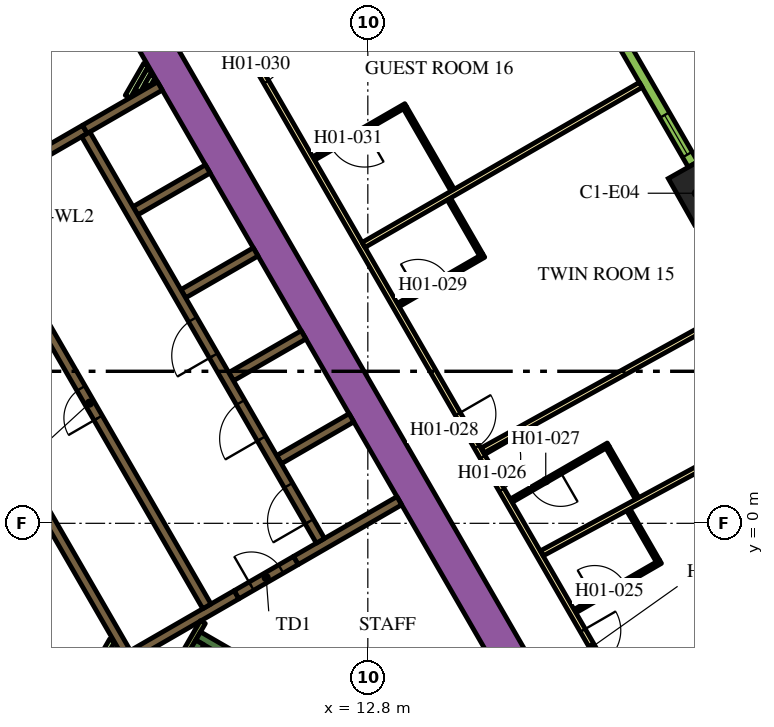
"""IFC4 building model, lengths in metres.
Left out: names, types, materials, properties, quantities, classifications, styles, units other than length and angle.
Written with IfcOpenShell. Run it as: python <this file> out.ifc"""

import sys

from ifc_helpers import new_model, si_unit, direction, frame, frame_2d, origin, origin_2d, place, context, subcontext, project, spatial, polyline, rectangle, outline, extrude, element, fill, save


model = new_model("IFC4")
c1 = context("Model", 3, precision=1e-05, world=origin(), true_north=direction((0.0, 1.0)))
c2 = subcontext(c1, "Body", "Model", "MODEL_VIEW")
j1 = project(units=[si_unit("LENGTHUNIT", "METRE"), si_unit("PLANEANGLEUNIT", "RADIAN")], contexts=[c1])
p1 = place(None, origin())
s1 = spatial("IfcSite", under=j1, at=p1, CompositionType="ELEMENT")
p2 = place(p1, origin())
s2 = spatial("IfcBuilding", under=s1, at=p2, CompositionType="ELEMENT")
p3 = place(p2, frame((0.0, 0.0, 31.5)))
s3 = spatial("IfcBuildingStorey", under=s2, at=p3, CompositionType="ELEMENT", Elevation=31.5)
p4 = place(p3, frame((21.443, 8.685, 0.0), z_axis=(0.0, 0.0, 1.0), x_axis=(-0.491973853463, 0.870609974391, 0.0)))
e1 = element("IfcColumn", 1, at=p4, inside=s3, PredefinedType="COLUMN", context=c2, shape_type="SweptSolid", body=[
    extrude(rectangle(XDim=1.4, YDim=0.9, at=origin_2d()), origin(), (0.0, 0.0, 1.0), 3.9),
])
p5 = place(p3, frame((6.711, 13.476, 0.0), z_axis=(0.0, 0.0, 1.0), x_axis=(0.500002723396, -0.866023831425, 0.0)))
e2 = element("IfcWall", 2, at=p5, inside=s3, PredefinedType="SOLIDWALL", context=c2, shape_type="SweptSolid", body=[
    extrude(rectangle(XDim=20.334, YDim=0.9, at=frame_2d((10.167, 0.0))), origin(), (0.0, 0.0, 1.0), 3.9),
])
p6 = place(p3, frame((8.334, -2.964, 0.0), z_axis=(0.0, 0.0, 1.0), x_axis=(0.866016039709, -0.500016218704, 0.0)))
e3 = element("IfcWall", 3, at=p6, inside=s3, PredefinedType="SOLIDWALL", context=c2, shape_type="SweptSolid", body=[
    extrude(rectangle(XDim=7.05, YDim=0.25, at=frame_2d((3.525, 0.0))), origin(), (0.0, 0.0, 1.0), 3.9),
])
p7 = place(p3, frame((8.168, -3.503, 0.0), z_axis=(0.0, 0.0, 1.0), x_axis=(0.49972245349, 0.866185586049, 0.0)))
e4 = element("IfcWall", 4, at=p7, inside=s3, PredefinedType="SOLIDWALL", context=c2, shape_type="SweptSolid", body=[
    extrude(rectangle(XDim=0.425, YDim=0.25, at=frame_2d((0.212, 0.0))), origin(), (0.0, 0.0, 1.0), 3.9),
])
p8 = place(p3, frame((10.464, 1.677, 0.0), z_axis=(0.0, 0.0, 1.0), x_axis=(0.86605622881, 0.499946605688, 0.0)))
e5 = element("IfcWall", 5, at=p8, inside=s3, PredefinedType="SOLIDWALL", context=c2, shape_type="SweptSolid", body=[
    extrude(rectangle(XDim=2.2, YDim=0.25, at=frame_2d((1.1, 0.0))), origin(), (0.0, 0.0, 1.0), 3.9),
])
p9 = place(p3, frame((13.629, 0.594, 0.0), z_axis=(0.0, 0.0, 1.0), x_axis=(-0.86602790099, -0.499995674689, 0.0)))
e6 = element("IfcWall", 6, at=p9, inside=s3, PredefinedType="SOLIDWALL", context=c2, shape_type="SweptSolid", body=[
    extrude(rectangle(XDim=3.146, YDim=0.25, at=frame_2d((1.573, 0.0))), origin(), (0.0, 0.0, 1.0), 3.9),
])
p10 = place(p3, origin())
e7 = element("IfcWall", 7, at=p10, inside=s3, PredefinedType="SOLIDWALL", context=c2, shape_type="SweptSolid", body=[
    extrude(outline(polyline([(0.566, 6.725), (0.566, 6.875), (0.566, 6.875), (0.565, 6.875), (0.361, 6.875), (0.035, 7.439), (0.252, 7.564), (0.377, 7.348), (6.552, -3.348), (6.677, -3.564), (6.46, -3.689), (0.448, 6.725), (0.565, 6.725), (0.566, 6.725), (0.566, 6.725)])), origin(), (0.0, 0.0, 1.0), 3.9),
])
p11 = place(p3, frame((4.358, 9.791, 0.0), z_axis=(0.0, 0.0, 1.0), x_axis=(0.866079547155, 0.499906209203, 0.0)))
e8 = element("IfcWall", 8, at=p11, inside=s3, PredefinedType="SOLIDWALL", context=c2, shape_type="SweptSolid", body=[
    extrude(rectangle(XDim=1.15, YDim=0.25, at=frame_2d((0.575, 0.0))), origin(), (0.0, 0.0, 1.0), 3.9),
])
p12 = place(p3, frame((5.356, 10.367, 0.0), z_axis=(0.0, 0.0, 1.0), x_axis=(0.865978535641, 0.50008116922, 0.0)))
e9 = element("IfcWall", 9, at=p12, inside=s3, PredefinedType="SOLIDWALL", context=c2, shape_type="SweptSolid", body=[
    extrude(rectangle(XDim=2.278, YDim=0.25, at=frame_2d((1.139, 0.0))), origin(), (0.0, 0.0, 1.0), 3.9),
])
p13 = place(p3, frame((6.614, -3.456, 0.0), z_axis=(0.0, 0.0, 1.0), x_axis=(0.86602447079, 0.500001615989, 0.0)))
e10 = element("IfcWall", 10, at=p13, inside=s3, PredefinedType="SOLIDWALL", context=c2, shape_type="SweptSolid", body=[
    extrude(rectangle(XDim=3.154, YDim=0.25, at=frame_2d((1.577, 0.0))), origin(), (0.0, 0.0, 1.0), 3.9),
])
for number, where, z_axis, x_axis in (
    (11, (6.684, 8.224, 0.0), (0.0, 0.0, 1.0), (0.866, 0.5, 0.0)),
    (12, (7.944, 6.041, 0.0), (0.0, 0.0, 1.0), (0.866, 0.5, 0.0)),
    (13, (9.204, 3.859, 0.0), (0.0, 0.0, 1.0), (0.866, 0.5, 0.0)),
):
    element("IfcWall", number, at=place(p3, frame(where, z_axis=z_axis, x_axis=x_axis)), inside=s3, PredefinedType="SOLIDWALL", context=c2, shape_type="SweptSolid", body=[
        extrude(rectangle(XDim=2.2, YDim=0.25, at=frame_2d((1.1, 0.0))), origin(), (0.0, 0.0, 1.0), 3.9),
    ])
p14 = place(p3, frame((5.705, -3.718, 0.0), z_axis=(0.0, 0.0, 1.0), x_axis=(0.499962090823, 0.866047289552, 0.0)))
e14 = element("IfcWall", 14, at=p14, inside=s3, PredefinedType="PARTITIONING", context=c2, shape_type="SweptSolid", body=[
    extrude(rectangle(XDim=0.735, YDim=0.15, at=frame_2d((0.367, 0.0))), origin(), (0.0, 0.0, 1.0), 2.75),
])
p15 = place(p3, frame((8.459, -2.599, 0.0), z_axis=(0.0, 0.0, 1.0), x_axis=(-0.500041054325, -0.866001699761, 0.0)))
e15 = element("IfcWall", 15, at=p15, inside=s3, PredefinedType="PARTITIONING", context=c2, shape_type="SweptSolid", body=[
    extrude(rectangle(XDim=0.929, YDim=0.15, at=frame_2d((0.464, 0.0))), origin(), (0.0, 0.0, 1.0), 3.9),
])
p16 = place(p3, frame((6.482, 11.225, 0.0), z_axis=(0.0, 0.0, 1.0), x_axis=(0.5001061818, 0.865964091014, 0.0)))
e16 = element("IfcWall", 16, at=p16, inside=s3, PredefinedType="PARTITIONING", context=c2, shape_type="SweptSolid", body=[
    extrude(rectangle(XDim=0.973, YDim=0.15, at=frame_2d((0.486, 0.0))), origin(), (0.0, 0.0, 1.0), 2.75),
])
p17 = place(p3, frame((6.742, 11.375, 0.0), z_axis=(0.0, 0.0, 1.0), x_axis=(0.499744951064, 0.86617260629, 0.0)))
e17 = element("IfcWall", 17, at=p17, inside=s3, PredefinedType="PARTITIONING", context=c2, shape_type="SweptSolid", body=[
    extrude(rectangle(XDim=0.626, YDim=0.15, at=frame_2d((0.313, 0.0))), origin(), (0.0, 0.0, 1.0), 2.75),
])
p18 = place(p3, frame((7.001, 11.525, 0.0), z_axis=(0.0, 0.0, 1.0), x_axis=(0.499797962495, 0.866142018774, 0.0)))
e18 = element("IfcWall", 18, at=p18, inside=s3, PredefinedType="PARTITIONING", context=c2, shape_type="SweptSolid", body=[
    extrude(rectangle(XDim=0.28, YDim=0.15, at=frame_2d((0.14, 0.0))), origin(), (0.0, 0.0, 1.0), 2.75),
])
p19 = place(p3, frame((11.553, -0.46, 0.0), z_axis=(0.0, 0.0, 1.0), x_axis=(-0.500006514828, 0.866021642414, 0.0)))
e19 = element("IfcWall", 19, at=p19, inside=s3, PredefinedType="SOLIDWALL", context=c2, shape_type="SweptSolid", body=[
    extrude(rectangle(XDim=12.35, YDim=0.25, at=frame_2d((6.175, 0.0))), origin(), (0.0, 0.0, 1.0), 3.9),
])
p20 = place(p19, frame((0.585, 0.0, 0.0)))
e20 = element("IfcOpeningElement", 20, at=p20, cuts=e19, PredefinedType="OPENING", context=c2, shape_type="SweptSolid", body=[
    extrude(rectangle(XDim=1.1, YDim=2.1, at=frame_2d((0.55, 1.05))), frame((0.0, 0.135, 0.0), z_axis=(0.0, -1.0, 0.0), x_axis=(1.0, 0.0, 0.0)), (0.0, 0.0, 1.0), 0.27),
])
p21 = place(p19, frame((3.105, 0.0, 0.0)))
e21 = element("IfcOpeningElement", 21, at=p21, cuts=e19, PredefinedType="OPENING", context=c2, shape_type="SweptSolid", body=[
    extrude(rectangle(XDim=1.1, YDim=2.1, at=frame_2d((0.55, 1.05))), frame((0.0, 0.135, 0.0), z_axis=(0.0, -1.0, 0.0), x_axis=(1.0, 0.0, 0.0)), (0.0, 0.0, 1.0), 0.27),
])
p22 = place(p19, frame((5.625, 0.0, 0.0)))
e22 = element("IfcOpeningElement", 22, at=p22, cuts=e19, PredefinedType="OPENING", context=c2, shape_type="SweptSolid", body=[
    extrude(rectangle(XDim=1.1, YDim=2.1, at=frame_2d((0.55, 1.05))), frame((0.0, 0.135, 0.0), z_axis=(0.0, -1.0, 0.0), x_axis=(1.0, 0.0, 0.0)), (0.0, 0.0, 1.0), 0.27),
])
p23 = place(p3, frame((8.565, -2.185, 0.0), z_axis=(0.0, 0.0, 1.0), x_axis=(-0.499997954832, 0.866026584559, 0.0)))
e23 = element("IfcWall", 23, at=p23, inside=s3, PredefinedType="SOLIDWALL", context=c2, shape_type="SweptSolid", body=[
    extrude(rectangle(XDim=12.35, YDim=0.25, at=frame_2d((6.175, 0.0))), origin(), (0.0, 0.0, 1.0), 3.9),
])
p24 = place(p23, frame((5.725, 0.0, 0.0)))
e24 = element("IfcOpeningElement", 24, at=p24, cuts=e23, PredefinedType="OPENING", context=c2, shape_type="SweptSolid", body=[
    extrude(rectangle(XDim=0.9, YDim=2.1, at=frame_2d((0.45, 1.05))), frame((0.0, 0.135, 0.0), z_axis=(0.0, -1.0, 0.0), x_axis=(1.0, 0.0, 0.0)), (0.0, 0.0, 1.0), 0.27),
])
p25 = place(p3, frame((9.346, -1.879, 0.0), z_axis=(0.0, 0.0, 1.0), x_axis=(0.866047807691, 0.499961193289, 0.0)))
e25 = element("IfcWall", 25, at=p25, inside=s3, PredefinedType="SOLIDWALL", context=c2, shape_type="SweptSolid", body=[
    extrude(rectangle(XDim=1.8, YDim=0.25, at=frame_2d((0.9, 0.0))), origin(), (0.0, 0.0, 1.0), 3.9),
])
p26 = place(p25, frame((0.45, 0.0, 0.0)))
e26 = element("IfcOpeningElement", 26, at=p26, cuts=e25, PredefinedType="OPENING", context=c2, shape_type="SweptSolid", body=[
    extrude(rectangle(XDim=0.9, YDim=2.1, at=frame_2d((0.45, 1.05))), frame((0.0, 0.135, 0.0), z_axis=(0.0, -1.0, 0.0), x_axis=(1.0, 0.0, 0.0)), (0.0, 0.0, 1.0), 0.27),
])
p27 = place(p3, frame((6.163, 18.475, 0.0), z_axis=(0.0, 0.0, 1.0), x_axis=(0.500001317485, -0.866024643133, 0.0)))
e27 = element("IfcWall", 27, at=p27, inside=s3, PredefinedType="PARTITIONING", context=c2, shape_type="SweptSolid", body=[
    extrude(rectangle(XDim=25.767, YDim=0.15, at=frame_2d((12.883, 0.0))), origin(), (0.0, 0.0, 1.0), 2.75),
])
p28 = place(p27, frame((24.586, 0.0, 0.0)))
e28 = element("IfcOpeningElement", 28, at=p28, cuts=e27, PredefinedType="OPENING", context=c2, shape_type="SweptSolid", body=[
    extrude(rectangle(XDim=1.0, YDim=2.1, at=frame_2d((0.5, 1.05))), frame((0.0, 0.085, 0.0), z_axis=(0.0, -1.0, 0.0), x_axis=(1.0, 0.0, 0.0)), (0.0, 0.0, 1.0), 0.17),
])
p29 = place(p27, frame((19.319, 0.0, 0.0)))
e29 = element("IfcOpeningElement", 29, at=p29, cuts=e27, PredefinedType="OPENING", context=c2, shape_type="SweptSolid", body=[
    extrude(rectangle(XDim=1.0, YDim=2.1, at=frame_2d((0.5, 1.05))), frame((0.0, 0.085, 0.0), z_axis=(0.0, -1.0, 0.0), x_axis=(1.0, 0.0, 0.0)), (0.0, 0.0, 1.0), 0.17),
])
p30 = place(p27, frame((18.012, 0.0, 0.0)))
e30 = element("IfcOpeningElement", 30, at=p30, cuts=e27, PredefinedType="OPENING", context=c2, shape_type="SweptSolid", body=[
    extrude(rectangle(XDim=1.0, YDim=2.1, at=frame_2d((0.5, 1.05))), frame((0.0, 0.085, 0.0), z_axis=(0.0, -1.0, 0.0), x_axis=(1.0, 0.0, 0.0)), (0.0, 0.0, 1.0), 0.17),
])
p31 = place(p27, frame((6.824, 0.0, 0.0)))
e31 = element("IfcOpeningElement", 31, at=p31, cuts=e27, PredefinedType="OPENING", context=c2, shape_type="SweptSolid", body=[
    extrude(rectangle(XDim=1.1, YDim=2.1, at=frame_2d((0.55, 1.05))), frame((0.0, 0.085, 0.0), z_axis=(0.0, -1.0, 0.0), x_axis=(1.0, 0.0, 0.0)), (0.0, 0.0, 1.0), 0.17),
])
p32 = place(p27, frame((4.658, 0.0, 0.0)))
e32 = element("IfcOpeningElement", 32, at=p32, cuts=e27, PredefinedType="OPENING", context=c2, shape_type="SweptSolid", body=[
    extrude(rectangle(XDim=0.9, YDim=2.1, at=frame_2d((0.45, 1.05))), frame((0.0, 0.085, 0.0), z_axis=(0.0, -1.0, 0.0), x_axis=(1.0, 0.0, 0.0)), (0.0, 0.0, 1.0), 0.17),
])
p33 = place(p27, frame((0.18, 0.0, 0.0)))
e33 = element("IfcOpeningElement", 33, at=p33, cuts=e27, PredefinedType="OPENING", context=c2, shape_type="SweptSolid", body=[
    extrude(rectangle(XDim=1.0, YDim=2.1, at=frame_2d((0.5, 1.05))), frame((0.0, 0.085, 0.0), z_axis=(0.0, -1.0, 0.0), x_axis=(1.0, 0.0, 0.0)), (0.0, 0.0, 1.0), 0.17),
])
p34 = place(p3, frame((19.982, 11.537, 0.0), z_axis=(0.0, 0.0, 1.0), x_axis=(-0.866020994654, -0.500007636761, 0.0)))
e34 = element("IfcWall", 34, at=p34, inside=s3, PredefinedType="PARTITIONING", context=c2, shape_type="SweptSolid", body=[
    extrude(rectangle(XDim=8.423, YDim=0.15, at=frame_2d((4.211, 0.0))), origin(), (0.0, 0.0, 1.0), 2.75),
])
p35 = place(p3, frame((23.132, 5.962, 0.0), z_axis=(0.0, 0.0, 1.0), x_axis=(-0.875121716713, -0.483902863121, 0.0)))
e35 = element("IfcWall", 35, at=p35, inside=s3, PredefinedType="PARTITIONING", context=c2, shape_type="SweptSolid", body=[
    extrude(rectangle(XDim=8.355, YDim=0.15, at=frame_2d((4.178, 0.0))), origin(), (0.0, 0.0, 1.0), 2.75),
])
p36 = place(p3, frame((27.134, -2.779, 0.0), z_axis=(0.0, 0.0, 1.0), x_axis=(-0.8882049501, -0.459447457951, 0.0)))
e36 = element("IfcWall", 36, at=p36, inside=s3, PredefinedType="PARTITIONING", context=c2, shape_type="SweptSolid", body=[
    extrude(rectangle(XDim=11.638, YDim=0.15, at=frame_2d((5.819, 0.0))), origin(), (0.0, 0.0, 1.0), 2.75),
])
p37 = place(p3, frame((24.145, 2.871, 0.0), z_axis=(0.0, 0.0, 1.0), x_axis=(-0.879551725039, -0.475803281809, 0.0)))
e37 = element("IfcWall", 37, at=p37, inside=s3, PredefinedType="PARTITIONING", context=c2, shape_type="SweptSolid", body=[
    extrude(rectangle(XDim=7.688, YDim=0.15, at=frame_2d((3.844, 0.0))), origin(), (0.0, 0.0, 1.0), 2.75),
])
p38 = place(p3, frame((18.25, -2.311, 0.0), z_axis=(0.0, 0.0, 1.0), x_axis=(0.866021400173, 0.500006934395, 0.0)))
e38 = element("IfcWall", 38, at=p38, inside=s3, PredefinedType="PARTITIONING", context=c2, shape_type="SweptSolid", body=[
    extrude(rectangle(XDim=2.6, YDim=0.1, at=frame_2d((1.3, 0.0))), origin(), (0.0, 0.0, 1.0), 2.75),
])
p39 = place(p38, frame((0.6, 0.0, 0.0)))
e39 = element("IfcOpeningElement", 39, at=p39, cuts=e38, PredefinedType="OPENING", context=c2, shape_type="SweptSolid", body=[
    extrude(rectangle(XDim=0.9, YDim=2.1, at=frame_2d((0.45, 1.05))), frame((0.0, 0.06, 0.0), z_axis=(0.0, -1.0, 0.0), x_axis=(1.0, 0.0, 0.0)), (0.0, 0.0, 1.0), 0.12),
])
p40 = place(p3, frame((20.434, -0.993, 0.0), z_axis=(0.0, 0.0, 1.0), x_axis=(-0.500086022567, 0.865975732936, 0.0)))
e40 = element("IfcWall", 40, at=p40, inside=s3, PredefinedType="PARTITIONING", context=c2, shape_type="SweptSolid", body=[
    extrude(rectangle(XDim=1.55, YDim=0.1, at=frame_2d((0.775, 0.0))), origin(), (0.0, 0.0, 1.0), 2.75),
])
p41 = place(p3, frame((19.127, 2.071, 0.0), z_axis=(0.0, 0.0, 1.0), x_axis=(-0.866003658127, -0.500037662692, 0.0)))
e41 = element("IfcWall", 41, at=p41, inside=s3, PredefinedType="PARTITIONING", context=c2, shape_type="SweptSolid", body=[
    extrude(rectangle(XDim=2.95, YDim=0.1, at=frame_2d((1.475, 0.0))), origin(), (0.0, 0.0, 1.0), 2.75),
])
p42 = place(p41, frame((1.45, 0.0, 0.0)))
e42 = element("IfcOpeningElement", 42, at=p42, cuts=e41, PredefinedType="OPENING", context=c2, shape_type="SweptSolid", body=[
    extrude(rectangle(XDim=0.9, YDim=2.1, at=frame_2d((0.45, 1.05))), frame((0.0, 0.06, 0.0), z_axis=(0.0, -1.0, 0.0), x_axis=(1.0, 0.0, 0.0)), (0.0, 0.0, 1.0), 0.12),
])
p43 = place(p3, frame((19.109, 2.002, 0.0), z_axis=(0.0, 0.0, 1.0), x_axis=(0.500086022567, -0.865975732936, 0.0)))
e43 = element("IfcWall", 43, at=p43, inside=s3, PredefinedType="PARTITIONING", context=c2, shape_type="SweptSolid", body=[
    extrude(rectangle(XDim=1.55, YDim=0.1, at=frame_2d((0.775, 0.0))), origin(), (0.0, 0.0, 1.0), 2.75),
])
p44 = place(p3, frame((13.6, 5.744, 0.0), z_axis=(0.0, 0.0, 1.0), x_axis=(0.866021400173, 0.500006934395, 0.0)))
e44 = element("IfcWall", 44, at=p44, inside=s3, PredefinedType="PARTITIONING", context=c2, shape_type="SweptSolid", body=[
    extrude(rectangle(XDim=2.6, YDim=0.1, at=frame_2d((1.3, 0.0))), origin(), (0.0, 0.0, 1.0), 2.75),
])
p45 = place(p44, frame((0.6, 0.0, 0.0)))
e45 = element("IfcOpeningElement", 45, at=p45, cuts=e44, PredefinedType="OPENING", context=c2, shape_type="SweptSolid", body=[
    extrude(rectangle(XDim=0.9, YDim=2.1, at=frame_2d((0.45, 1.05))), frame((0.0, 0.06, 0.0), z_axis=(0.0, -1.0, 0.0), x_axis=(1.0, 0.0, 0.0)), (0.0, 0.0, 1.0), 0.12),
])
p46 = place(p3, frame((15.779, 7.071, 0.0), z_axis=(0.0, 0.0, 1.0), x_axis=(-0.499976720371, 0.866038843867, 0.0)))
e46 = element("IfcWall", 46, at=p46, inside=s3, PredefinedType="PARTITIONING", context=c2, shape_type="SweptSolid", body=[
    extrude(rectangle(XDim=1.69, YDim=0.1, at=frame_2d((0.845, 0.0))), origin(), (0.0, 0.0, 1.0), 2.75),
])
p47 = place(p3, frame((13.799, 10.999, 0.0), z_axis=(0.0, 0.0, 1.0), x_axis=(-0.866034573852, -0.49998411664, 0.0)))
e47 = element("IfcWall", 47, at=p47, inside=s3, PredefinedType="PARTITIONING", context=c2, shape_type="SweptSolid", body=[
    extrude(rectangle(XDim=2.8, YDim=0.1, at=frame_2d((1.4, 0.0))), origin(), (0.0, 0.0, 1.0), 2.75),
])
p48 = place(p47, frame((1.25, 0.0, 0.0)))
e48 = element("IfcOpeningElement", 48, at=p48, cuts=e47, PredefinedType="OPENING", context=c2, shape_type="SweptSolid", body=[
    extrude(rectangle(XDim=1.0, YDim=2.1, at=frame_2d((0.5, 1.05))), frame((0.0, 0.06, 0.0), z_axis=(0.0, -1.0, 0.0), x_axis=(1.0, 0.0, 0.0)), (0.0, 0.0, 1.0), 0.12),
])
p49 = place(p3, frame((13.781, 10.931, 0.0), z_axis=(0.0, 0.0, 1.0), x_axis=(0.500004234368, -0.866022959057, 0.0)))
e49 = element("IfcWall", 49, at=p49, inside=s3, PredefinedType="PARTITIONING", context=c2, shape_type="SweptSolid", body=[
    extrude(rectangle(XDim=2.5, YDim=0.1, at=frame_2d((1.25, 0.0))), origin(), (0.0, 0.0, 1.0), 2.75),
])
p50 = place(p3, frame((21.357, 9.445, 0.0), z_axis=(0.0, 0.0, 1.0), x_axis=(-0.50002123722, 0.866013142123, 0.0)))
e50 = element("IfcWall", 50, at=p50, inside=s3, PredefinedType="SOLIDWALL", context=c2, shape_type="SweptSolid", body=[
    extrude(rectangle(XDim=4.998, YDim=0.29, at=frame_2d((2.499, 0.0))), origin(), (0.0, 0.0, 1.0), 3.65),
])
p51 = place(p50, frame((0.297, 0.0, 0.9)))
e51 = element("IfcOpeningElement", 51, at=p51, cuts=e50, PredefinedType="OPENING", context=c2, shape_type="SweptSolid", body=[
    extrude(rectangle(XDim=1.2, YDim=2.15, at=frame_2d((0.6, 1.075))), frame((0.0, 0.155, 0.0), z_axis=(0.0, -1.0, 0.0), x_axis=(1.0, 0.0, 0.0)), (0.0, 0.0, 1.0), 0.31),
])
p52 = place(p50, frame((3.501, 0.0, 0.9)))
e52 = element("IfcOpeningElement", 52, at=p52, cuts=e50, PredefinedType="OPENING", context=c2, shape_type="SweptSolid", body=[
    extrude(rectangle(XDim=1.2, YDim=2.15, at=frame_2d((0.6, 1.075))), frame((0.0, 0.155, 0.0), z_axis=(0.0, -1.0, 0.0), x_axis=(1.0, 0.0, 0.0)), (0.0, 0.0, 1.0), 0.31),
])
p53 = place(p20, origin())
e53 = element("IfcDoor", 53, at=p53, inside=s3, OperationType="DOUBLE_DOOR_SLIDING", PredefinedType="DOOR", context=c2, shape_type="SweptSolid", body=[
    extrude(rectangle(XDim=1.1, YDim=2.1, at=frame_2d((0.55, 1.05))), frame((0.0, 0.025, 0.0), z_axis=(0.0, -1.0, 0.0), x_axis=(1.0, 0.0, 0.0)), (0.0, 0.0, 1.0), 0.05),
])
fill(e20, e53)
p54 = place(p21, origin())
e54 = element("IfcDoor", 54, at=p54, inside=s3, OperationType="DOUBLE_DOOR_SLIDING", PredefinedType="DOOR", context=c2, shape_type="SweptSolid", body=[
    extrude(rectangle(XDim=1.1, YDim=2.1, at=frame_2d((0.55, 1.05))), frame((0.0, 0.025, 0.0), z_axis=(0.0, -1.0, 0.0), x_axis=(1.0, 0.0, 0.0)), (0.0, 0.0, 1.0), 0.05),
])
fill(e21, e54)
p55 = place(p22, origin())
e55 = element("IfcDoor", 55, at=p55, inside=s3, OperationType="DOUBLE_DOOR_SLIDING", PredefinedType="DOOR", context=c2, shape_type="SweptSolid", body=[
    extrude(rectangle(XDim=1.1, YDim=2.1, at=frame_2d((0.55, 1.05))), frame((0.0, 0.025, 0.0), z_axis=(0.0, -1.0, 0.0), x_axis=(1.0, 0.0, 0.0)), (0.0, 0.0, 1.0), 0.05),
])
fill(e22, e55)
p56 = place(p24, origin())
e56 = element("IfcDoor", 56, at=p56, inside=s3, OperationType="SINGLE_SWING_LEFT", PredefinedType="DOOR", context=c2, shape_type="SweptSolid", body=[
    extrude(rectangle(XDim=0.9, YDim=2.1, at=frame_2d((0.45, 1.05))), frame((0.0, 0.025, 0.0), z_axis=(0.0, -1.0, 0.0), x_axis=(1.0, 0.0, 0.0)), (0.0, 0.0, 1.0), 0.05),
])
fill(e24, e56)
p57 = place(p26, origin())
e57 = element("IfcDoor", 57, at=p57, inside=s3, OperationType="SINGLE_SWING_LEFT", PredefinedType="DOOR", context=c2, shape_type="SweptSolid", body=[
    extrude(rectangle(XDim=0.9, YDim=2.1, at=frame_2d((0.45, 1.05))), frame((0.0, 0.025, 0.0), z_axis=(0.0, -1.0, 0.0), x_axis=(1.0, 0.0, 0.0)), (0.0, 0.0, 1.0), 0.05),
])
fill(e26, e57)
p58 = place(p28, origin())
e58 = element("IfcDoor", 58, at=p58, inside=s3, OperationType="SINGLE_SWING_RIGHT", PredefinedType="DOOR", context=c2, shape_type="SweptSolid", body=[
    extrude(rectangle(XDim=1.0, YDim=2.1, at=frame_2d((0.5, 1.05))), frame((0.0, 0.025, 0.0), z_axis=(0.0, -1.0, 0.0), x_axis=(1.0, 0.0, 0.0)), (0.0, 0.0, 1.0), 0.05),
])
fill(e28, e58)
p59 = place(p39, origin())
e59 = element("IfcDoor", 59, at=p59, inside=s3, OperationType="SINGLE_SWING_LEFT", PredefinedType="DOOR", context=c2, shape_type="SweptSolid", body=[
    extrude(rectangle(XDim=0.9, YDim=2.1, at=frame_2d((0.45, 1.05))), frame((0.0, 0.025, 0.0), z_axis=(0.0, -1.0, 0.0), x_axis=(1.0, 0.0, 0.0)), (0.0, 0.0, 1.0), 0.05),
])
fill(e39, e59)
p60 = place(p29, origin())
e60 = element("IfcDoor", 60, at=p60, inside=s3, OperationType="SINGLE_SWING_LEFT", PredefinedType="DOOR", context=c2, shape_type="SweptSolid", body=[
    extrude(rectangle(XDim=1.0, YDim=2.1, at=frame_2d((0.5, 1.05))), frame((0.0, 0.025, 0.0), z_axis=(0.0, -1.0, 0.0), x_axis=(1.0, 0.0, 0.0)), (0.0, 0.0, 1.0), 0.05),
])
fill(e29, e60)
p61 = place(p42, origin())
e61 = element("IfcDoor", 61, at=p61, inside=s3, OperationType="SINGLE_SWING_LEFT", PredefinedType="DOOR", context=c2, shape_type="SweptSolid", body=[
    extrude(rectangle(XDim=0.9, YDim=2.1, at=frame_2d((0.45, 1.05))), frame((0.0, 0.025, 0.0), z_axis=(0.0, -1.0, 0.0), x_axis=(1.0, 0.0, 0.0)), (0.0, 0.0, 1.0), 0.05),
])
fill(e42, e61)
p62 = place(p30, origin())
e62 = element("IfcDoor", 62, at=p62, inside=s3, OperationType="SINGLE_SWING_RIGHT", PredefinedType="DOOR", context=c2, shape_type="SweptSolid", body=[
    extrude(rectangle(XDim=1.0, YDim=2.1, at=frame_2d((0.5, 1.05))), frame((0.0, 0.025, 0.0), z_axis=(0.0, -1.0, 0.0), x_axis=(1.0, 0.0, 0.0)), (0.0, 0.0, 1.0), 0.05),
])
fill(e30, e62)
p63 = place(p45, origin())
e63 = element("IfcDoor", 63, at=p63, inside=s3, OperationType="SINGLE_SWING_RIGHT", PredefinedType="DOOR", context=c2, shape_type="SweptSolid", body=[
    extrude(rectangle(XDim=0.9, YDim=2.1, at=frame_2d((0.45, 1.05))), frame((0.0, 0.025, 0.0), z_axis=(0.0, -1.0, 0.0), x_axis=(1.0, 0.0, 0.0)), (0.0, 0.0, 1.0), 0.05),
])
fill(e45, e63)
p64 = place(p31, origin())
e64 = element("IfcDoor", 64, at=p64, inside=s3, OperationType="SINGLE_SWING_LEFT", PredefinedType="DOOR", context=c2, shape_type="SweptSolid", body=[
    extrude(rectangle(XDim=1.1, YDim=2.1, at=frame_2d((0.55, 1.05))), frame((0.0, 0.025, 0.0), z_axis=(0.0, -1.0, 0.0), x_axis=(1.0, 0.0, 0.0)), (0.0, 0.0, 1.0), 0.05),
])
fill(e31, e64)
p65 = place(p48, origin())
e65 = element("IfcDoor", 65, at=p65, inside=s3, OperationType="SINGLE_SWING_LEFT", PredefinedType="DOOR", context=c2, shape_type="SweptSolid", body=[
    extrude(rectangle(XDim=1.0, YDim=2.1, at=frame_2d((0.5, 1.05))), frame((0.0, 0.025, 0.0), z_axis=(0.0, -1.0, 0.0), x_axis=(1.0, 0.0, 0.0)), (0.0, 0.0, 1.0), 0.05),
])
fill(e48, e65)
p66 = place(p51, origin())
e66 = element("IfcWindow", 66, at=p66, inside=s3, PartitioningType="DOUBLE_PANEL_VERTICAL", PredefinedType="WINDOW", context=c2, shape_type="SweptSolid", body=[
    extrude(rectangle(XDim=1.2, YDim=2.15, at=frame_2d((0.6, 1.075))), frame((0.0, 0.015, 0.0), z_axis=(0.0, -1.0, 0.0), x_axis=(1.0, 0.0, 0.0)), (0.0, 0.0, 1.0), 0.06),
])
fill(e51, e66)
save(model, sys.argv[1])
